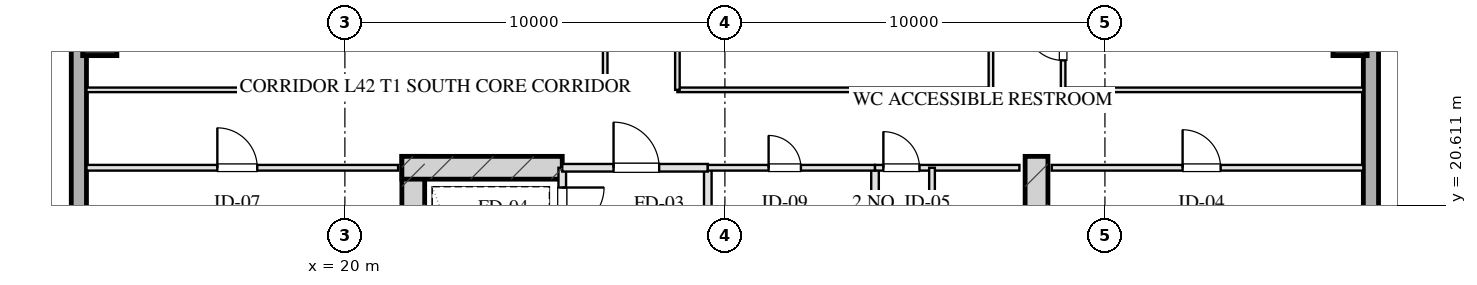
"""IFC4 building model, lengths in metres.
Left out: names, types, materials, properties, quantities, classifications, styles, units other than length and angle.
Written with IfcOpenShell. Run it as: python <this file> out.ifc"""

import sys

from ifc_helpers import new_model, si_unit, direction, frame, frame_2d, origin, origin_2d, place, context, subcontext, project, spatial, rectangle, hollow_rectangle, extrude, element, fill, save


model = new_model("IFC4")
c1 = context("Model", 3, precision=1e-05, world=origin(), true_north=direction((0.0, 1.0)))
c2 = subcontext(c1, "Body", "Model", "MODEL_VIEW")
j1 = project(units=[si_unit("LENGTHUNIT", "METRE"), si_unit("PLANEANGLEUNIT", "RADIAN")], contexts=[c1])
p1 = place(None, origin())
s1 = spatial("IfcSite", under=j1, at=p1, CompositionType="ELEMENT")
p2 = place(p1, origin())
s2 = spatial("IfcBuilding", under=s1, at=p2, CompositionType="ELEMENT")
p3 = place(p2, frame((0.0, 0.0, 159.85)))
s3 = spatial("IfcBuildingStorey", under=s2, at=p3, CompositionType="ELEMENT", Elevation=159.85)
for number, where, z_axis, x_axis in (
    (1, (21.8, 21.9, 0.0), (0.0, 0.0, 1.0), (0.0, -1.0, 0.0)),
    (2, (38.2, 21.9, 0.0), (0.0, 0.0, 1.0), (0.0, -1.0, 0.0)),
):
    element("IfcWall", number, at=place(p3, frame(where, z_axis=z_axis, x_axis=x_axis)), inside=s3, PredefinedType="SHEAR", context=c2, shape_type="SweptSolid", body=[
        extrude(rectangle(XDim=9.48, YDim=0.6, at=frame_2d((4.74, 0.0))), origin(), (0.0, 0.0, 1.0), 3.45),
    ])
p4 = place(p3, frame((21.5, 21.6, 0.0), z_axis=(0.0, 0.0, 1.0), x_axis=(1.0, 0.0, 0.0)))
e3 = element("IfcWall", 3, at=p4, inside=s3, PredefinedType="SHEAR", context=c2, shape_type="SweptSolid", body=[
    extrude(rectangle(XDim=4.22, YDim=0.6, at=frame_2d((2.11, 0.0))), origin(), (0.0, 0.0, 1.0), 3.45),
])
for number, where, z_axis, x_axis in (
    (4, (13.55, 25.0, 0.0), (0.0, 0.0, 1.0), (1.0, 0.0, 0.0)),
    (5, (46.45, 25.0, 0.0), (0.0, 0.0, 1.0), (1.0, 0.0, 0.0)),
):
    element("IfcColumn", number, at=place(p3, frame(where, z_axis=z_axis, x_axis=x_axis)), inside=s3, PredefinedType="COLUMN", context=c2, shape_type="SweptSolid", body=[
        extrude(hollow_rectangle(XDim=0.9, YDim=0.9, WallThickness=0.032, at=origin_2d()), origin(), (0.0, 0.0, 1.0), 3.451),
    ])
p5 = place(p3, frame((13.0, 10.8, 0.0), z_axis=(0.0, 0.0, 1.0), x_axis=(0.0, 1.0, 0.0)))
e6 = element("IfcWall", 6, at=p5, inside=s3, PredefinedType="SOLIDWALL", context=c2, shape_type="SweptSolid", body=[
    extrude(rectangle(XDim=46.4, YDim=0.4, at=frame_2d((23.2, 0.0))), origin(), (0.0, 0.0, 1.0), 2.61),
])
p6 = place(p5, frame((15.675, 0.0, 0.75)))
e7 = element("IfcOpeningElement", 7, at=p6, cuts=e6, PredefinedType="OPENING", context=c2, shape_type="SweptSolid", body=[
    extrude(rectangle(XDim=2.25, YDim=1.46, at=frame_2d((1.125, 0.73))), frame((0.0, 0.21, 0.0), z_axis=(0.0, -1.0, 0.0), x_axis=(1.0, 0.0, 0.0)), (0.0, 0.0, 1.0), 0.42),
])
p7 = place(p5, frame((28.475, 0.0, 0.75)))
e8 = element("IfcOpeningElement", 8, at=p7, cuts=e6, PredefinedType="OPENING", context=c2, shape_type="SweptSolid", body=[
    extrude(rectangle(XDim=2.25, YDim=1.46, at=frame_2d((1.125, 0.73))), frame((0.0, 0.21, 0.0), z_axis=(0.0, -1.0, 0.0), x_axis=(1.0, 0.0, 0.0)), (0.0, 0.0, 1.0), 0.42),
])
p8 = place(p3, frame((47.0, 57.2, 0.0), z_axis=(0.0, 0.0, 1.0), x_axis=(0.0, -1.0, 0.0)))
e9 = element("IfcWall", 9, at=p8, inside=s3, PredefinedType="SOLIDWALL", context=c2, shape_type="SweptSolid", body=[
    extrude(rectangle(XDim=46.4, YDim=0.4, at=frame_2d((23.2, 0.0))), origin(), (0.0, 0.0, 1.0), 2.61),
])
p9 = place(p3, frame((25.72, 21.6, 0.0), z_axis=(0.0, 0.0, 1.0), x_axis=(0.0, -1.0, 0.0)))
e10 = element("IfcWall", 10, at=p9, inside=s3, PredefinedType="PARTITIONING", context=c2, shape_type="SweptSolid", body=[
    extrude(rectangle(XDim=1.9, YDim=0.2, at=frame_2d((0.95, 0.0))), origin(), (0.0, 0.0, 1.0), 3.175),
])
p10 = place(p9, frame((0.52, 0.0, 0.0)))
e11 = element("IfcOpeningElement", 11, at=p10, cuts=e10, PredefinedType="OPENING", context=c2, shape_type="SweptSolid", body=[
    extrude(rectangle(XDim=1.1, YDim=2.05, at=frame_2d((0.55, 1.025))), frame((0.0, 0.11, 0.0), z_axis=(0.0, -1.0, 0.0), x_axis=(1.0, 0.0, 0.0)), (0.0, 0.0, 1.0), 0.22),
])
p11 = place(p3, frame((29.55, 21.6, 0.0), z_axis=(0.0, 0.0, 1.0), x_axis=(0.0, -1.0, 0.0)))
e12 = element("IfcWall", 12, at=p11, inside=s3, PredefinedType="PARTITIONING", context=c2, shape_type="SweptSolid", body=[
    extrude(rectangle(XDim=8.43, YDim=0.2, at=frame_2d((4.215, 0.0))), origin(), (0.0, 0.0, 1.0), 3.175),
])
p12 = place(p3, frame((25.72, 21.6, 0.0), z_axis=(0.0, 0.0, 1.0), x_axis=(1.0, 0.0, 0.0)))
e13 = element("IfcWall", 13, at=p12, inside=s3, PredefinedType="PARTITIONING", context=c2, shape_type="SweptSolid", body=[
    extrude(rectangle(XDim=3.83, YDim=0.2, at=frame_2d((1.915, 0.0))), origin(), (0.0, 0.0, 1.0), 3.175),
])
p13 = place(p12, frame((1.35, 0.0, 0.0)))
e14 = element("IfcOpeningElement", 14, at=p13, cuts=e13, PredefinedType="OPENING", context=c2, shape_type="SweptSolid", body=[
    extrude(rectangle(XDim=1.2, YDim=2.05, at=frame_2d((0.6, 1.025))), frame((0.0, 0.11, 0.0), z_axis=(0.0, -1.0, 0.0), x_axis=(1.0, 0.0, 0.0)), (0.0, 0.0, 1.0), 0.22),
])
p14 = place(p3, frame((33.95, 21.6, 0.0), z_axis=(0.0, 0.0, 1.0), x_axis=(0.0, -1.0, 0.0)))
e15 = element("IfcWall", 15, at=p14, inside=s3, PredefinedType="PARTITIONING", context=c2, shape_type="SweptSolid", body=[
    extrude(rectangle(XDim=8.43, YDim=0.2, at=frame_2d((4.215, 0.0))), origin(), (0.0, 0.0, 1.0), 3.175),
])
p15 = place(p3, frame((29.55, 21.6, 0.0), z_axis=(0.0, 0.0, 1.0), x_axis=(1.0, 0.0, 0.0)))
e16 = element("IfcWall", 16, at=p15, inside=s3, PredefinedType="PARTITIONING", context=c2, shape_type="SweptSolid", body=[
    extrude(rectangle(XDim=4.4, YDim=0.15, at=frame_2d((2.2, 0.0))), origin(), (0.0, 0.0, 1.0), 3.175),
])
p16 = place(p15, frame((1.6, 0.0, 0.0)))
e17 = element("IfcOpeningElement", 17, at=p16, cuts=e16, PredefinedType="OPENING", context=c2, shape_type="SweptSolid", body=[
    extrude(rectangle(XDim=0.85, YDim=2.05, at=frame_2d((0.425, 1.025))), frame((0.0, 0.085, 0.0), z_axis=(0.0, -1.0, 0.0), x_axis=(1.0, 0.0, 0.0)), (0.0, 0.0, 1.0), 0.17),
])
p17 = place(p3, frame((33.95, 21.6, 0.0), z_axis=(0.0, 0.0, 1.0), x_axis=(1.0, 0.0, 0.0)))
e18 = element("IfcWall", 18, at=p17, inside=s3, PredefinedType="PARTITIONING", context=c2, shape_type="SweptSolid", body=[
    extrude(rectangle(XDim=3.8, YDim=0.15, at=frame_2d((1.9, 0.0))), origin(), (0.0, 0.0, 1.0), 3.175),
])
p18 = place(p17, frame((0.22, 0.0, 0.0)))
e19 = element("IfcOpeningElement", 19, at=p18, cuts=e18, PredefinedType="OPENING", context=c2, shape_type="SweptSolid", body=[
    extrude(rectangle(XDim=0.95, YDim=2.05, at=frame_2d((0.475, 1.025))), frame((0.0, 0.085, 0.0), z_axis=(0.0, -1.0, 0.0), x_axis=(1.0, 0.0, 0.0)), (0.0, 0.0, 1.0), 0.17),
])
p19 = place(p3, frame((35.45, 21.6, 0.0), z_axis=(0.0, 0.0, 1.0), x_axis=(0.0, -1.0, 0.0)))
e20 = element("IfcWall", 20, at=p19, inside=s3, PredefinedType="PARTITIONING", context=c2, shape_type="SweptSolid", body=[
    extrude(rectangle(XDim=8.43, YDim=0.15, at=frame_2d((4.215, 0.0))), origin(), (0.0, 0.0, 1.0), 2.765),
])
p20 = place(p19, frame((2.55, 0.0, 0.0)))
e21 = element("IfcOpeningElement", 21, at=p20, cuts=e20, PredefinedType="OPENING", context=c2, shape_type="SweptSolid", body=[
    extrude(rectangle(XDim=0.95, YDim=2.05, at=frame_2d((0.475, 1.025))), frame((0.0, 0.085, 0.0), z_axis=(0.0, -1.0, 0.0), x_axis=(1.0, 0.0, 0.0)), (0.0, 0.0, 1.0), 0.17),
])
p21 = place(p19, frame((5.8, 0.0, 0.0)))
e22 = element("IfcOpeningElement", 22, at=p21, cuts=e20, PredefinedType="OPENING", context=c2, shape_type="SweptSolid", body=[
    extrude(rectangle(XDim=0.9, YDim=2.05, at=frame_2d((0.45, 1.025))), frame((0.0, 0.085, 0.0), z_axis=(0.0, -1.0, 0.0), x_axis=(1.0, 0.0, 0.0)), (0.0, 0.0, 1.0), 0.17),
])
p22 = place(p3, frame((13.2, 21.6, 0.0), z_axis=(0.0, 0.0, 1.0), x_axis=(1.0, 0.0, 0.0)))
e23 = element("IfcWall", 23, at=p22, inside=s3, PredefinedType="PARTITIONING", context=c2, shape_type="SweptSolid", body=[
    extrude(rectangle(XDim=8.2, YDim=0.15, at=frame_2d((4.1, 0.0))), origin(), (0.0, 0.0, 1.0), 3.175),
])
p23 = place(p22, frame((3.444, 0.0, 0.0)))
e24 = element("IfcOpeningElement", 24, at=p23, cuts=e23, PredefinedType="OPENING", context=c2, shape_type="SweptSolid", body=[
    extrude(rectangle(XDim=1.05, YDim=2.05, at=frame_2d((0.525, 1.025))), frame((0.0, 0.085, 0.0), z_axis=(0.0, -1.0, 0.0), x_axis=(1.0, 0.0, 0.0)), (0.0, 0.0, 1.0), 0.17),
])
p24 = place(p3, frame((38.6, 21.6, 0.0), z_axis=(0.0, 0.0, 1.0), x_axis=(1.0, 0.0, 0.0)))
e25 = element("IfcWall", 25, at=p24, inside=s3, PredefinedType="PARTITIONING", context=c2, shape_type="SweptSolid", body=[
    extrude(rectangle(XDim=8.2, YDim=0.15, at=frame_2d((4.1, 0.0))), origin(), (0.0, 0.0, 1.0), 3.175),
])
p25 = place(p24, frame((3.444, 0.0, 0.0)))
e26 = element("IfcOpeningElement", 26, at=p25, cuts=e25, PredefinedType="OPENING", context=c2, shape_type="SweptSolid", body=[
    extrude(rectangle(XDim=1.0, YDim=2.05, at=frame_2d((0.5, 1.025))), frame((0.0, 0.085, 0.0), z_axis=(0.0, -1.0, 0.0), x_axis=(1.0, 0.0, 0.0)), (0.0, 0.0, 1.0), 0.17),
])
p26 = place(p3, frame((13.2, 23.65, 0.0), z_axis=(0.0, 0.0, 1.0), x_axis=(1.0, 0.0, 0.0)))
e27 = element("IfcWall", 27, at=p26, inside=s3, PredefinedType="PARTITIONING", context=c2, shape_type="SweptSolid", body=[
    extrude(rectangle(XDim=13.65, YDim=0.12, at=frame_2d((6.825, 0.0))), origin(), (0.0, 0.0, 1.0), 3.175),
])
p27 = place(p3, frame((28.75, 23.65, 0.0), z_axis=(0.0, 0.0, 1.0), x_axis=(1.0, 0.0, 0.0)))
e28 = element("IfcWall", 28, at=p27, inside=s3, PredefinedType="PARTITIONING", context=c2, shape_type="SweptSolid", body=[
    extrude(rectangle(XDim=8.25, YDim=0.12, at=frame_2d((4.125, 0.0))), origin(), (0.0, 0.0, 1.0), 3.175),
])
p28 = place(p3, frame((38.9, 23.65, 0.0), z_axis=(0.0, 0.0, 1.0), x_axis=(1.0, 0.0, 0.0)))
e29 = element("IfcWall", 29, at=p28, inside=s3, PredefinedType="PARTITIONING", context=c2, shape_type="SweptSolid", body=[
    extrude(rectangle(XDim=7.9, YDim=0.12, at=frame_2d((3.95, 0.0))), origin(), (0.0, 0.0, 1.0), 3.175),
])
p29 = place(p3, frame((26.85, 23.65, 0.0), z_axis=(0.0, 0.0, 1.0), x_axis=(0.0, 1.0, 0.0)))
e30 = element("IfcWall", 30, at=p29, inside=s3, PredefinedType="PARTITIONING", context=c2, shape_type="SweptSolid", body=[
    extrude(rectangle(XDim=20.7, YDim=0.12, at=frame_2d((10.35, 0.0))), origin(), (0.0, 0.0, 1.0), 3.175),
])
p30 = place(p29, frame((2.675, 0.0, 0.0)))
e31 = element("IfcOpeningElement", 31, at=p30, cuts=e30, PredefinedType="OPENING", context=c2, shape_type="SweptSolid", body=[
    extrude(rectangle(XDim=1.0, YDim=2.05, at=frame_2d((0.5, 1.025))), frame((0.0, 0.07, 0.0), z_axis=(0.0, -1.0, 0.0), x_axis=(1.0, 0.0, 0.0)), (0.0, 0.0, 1.0), 0.14),
])
p31 = place(p29, frame((9.85, 0.0, 0.0)))
e32 = element("IfcOpeningElement", 32, at=p31, cuts=e30, PredefinedType="OPENING", context=c2, shape_type="SweptSolid", body=[
    extrude(rectangle(XDim=1.0, YDim=2.05, at=frame_2d((0.5, 1.025))), frame((0.0, 0.07, 0.0), z_axis=(0.0, -1.0, 0.0), x_axis=(1.0, 0.0, 0.0)), (0.0, 0.0, 1.0), 0.14),
])
p32 = place(p29, frame((17.025, 0.0, 0.0)))
e33 = element("IfcOpeningElement", 33, at=p32, cuts=e30, PredefinedType="OPENING", context=c2, shape_type="SweptSolid", body=[
    extrude(rectangle(XDim=1.0, YDim=2.05, at=frame_2d((0.5, 1.025))), frame((0.0, 0.07, 0.0), z_axis=(0.0, -1.0, 0.0), x_axis=(1.0, 0.0, 0.0)), (0.0, 0.0, 1.0), 0.14),
])
p33 = place(p3, frame((28.75, 23.65, 0.0), z_axis=(0.0, 0.0, 1.0), x_axis=(0.0, 1.0, 0.0)))
e34 = element("IfcWall", 34, at=p33, inside=s3, PredefinedType="PARTITIONING", context=c2, shape_type="SweptSolid", body=[
    extrude(rectangle(XDim=20.7, YDim=0.12, at=frame_2d((10.35, 0.0))), origin(), (0.0, 0.0, 1.0), 3.175),
])
p34 = place(p33, frame((9.936, 0.0, 0.0)))
e35 = element("IfcOpeningElement", 35, at=p34, cuts=e34, PredefinedType="OPENING", context=c2, shape_type="SweptSolid", body=[
    extrude(rectangle(XDim=1.1, YDim=2.05, at=frame_2d((0.55, 1.025))), frame((0.0, 0.07, 0.0), z_axis=(0.0, -1.0, 0.0), x_axis=(1.0, 0.0, 0.0)), (0.0, 0.0, 1.0), 0.14),
])
p35 = place(p3, frame((37.0, 23.65, 0.0), z_axis=(0.0, 0.0, 1.0), x_axis=(0.0, 1.0, 0.0)))
e36 = element("IfcWall", 36, at=p35, inside=s3, PredefinedType="PARTITIONING", context=c2, shape_type="SweptSolid", body=[
    extrude(rectangle(XDim=20.7, YDim=0.12, at=frame_2d((10.35, 0.0))), origin(), (0.0, 0.0, 1.0), 3.175),
])
p36 = place(p3, frame((38.9, 23.65, 0.0), z_axis=(0.0, 0.0, 1.0), x_axis=(0.0, 1.0, 0.0)))
e37 = element("IfcWall", 37, at=p36, inside=s3, PredefinedType="PARTITIONING", context=c2, shape_type="SweptSolid", body=[
    extrude(rectangle(XDim=20.7, YDim=0.12, at=frame_2d((10.35, 0.0))), origin(), (0.0, 0.0, 1.0), 3.175),
])
p37 = place(p36, frame((0.775, 0.0, 0.0)))
e38 = element("IfcOpeningElement", 38, at=p37, cuts=e37, PredefinedType="OPENING", context=c2, shape_type="SweptSolid", body=[
    extrude(rectangle(XDim=1.0, YDim=2.05, at=frame_2d((0.5, 1.025))), frame((0.0, 0.07, 0.0), z_axis=(0.0, -1.0, 0.0), x_axis=(1.0, 0.0, 0.0)), (0.0, 0.0, 1.0), 0.14),
])
p38 = place(p36, frame((3.95, 0.0, 0.0)))
e39 = element("IfcOpeningElement", 39, at=p38, cuts=e37, PredefinedType="OPENING", context=c2, shape_type="SweptSolid", body=[
    extrude(rectangle(XDim=1.0, YDim=2.05, at=frame_2d((0.5, 1.025))), frame((0.0, 0.07, 0.0), z_axis=(0.0, -1.0, 0.0), x_axis=(1.0, 0.0, 0.0)), (0.0, 0.0, 1.0), 0.14),
])
p39 = place(p36, frame((8.45, 0.0, 0.0)))
e40 = element("IfcOpeningElement", 40, at=p39, cuts=e37, PredefinedType="OPENING", context=c2, shape_type="SweptSolid", body=[
    extrude(rectangle(XDim=1.0, YDim=2.05, at=frame_2d((0.5, 1.025))), frame((0.0, 0.07, 0.0), z_axis=(0.0, -1.0, 0.0), x_axis=(1.0, 0.0, 0.0)), (0.0, 0.0, 1.0), 0.14),
])
p40 = place(p36, frame((12.95, 0.0, 0.0)))
e41 = element("IfcOpeningElement", 41, at=p40, cuts=e37, PredefinedType="OPENING", context=c2, shape_type="SweptSolid", body=[
    extrude(rectangle(XDim=1.0, YDim=2.05, at=frame_2d((0.5, 1.025))), frame((0.0, 0.07, 0.0), z_axis=(0.0, -1.0, 0.0), x_axis=(1.0, 0.0, 0.0)), (0.0, 0.0, 1.0), 0.14),
])
p41 = place(p36, frame((16.299, 0.0, 0.0)))
e42 = element("IfcOpeningElement", 42, at=p41, cuts=e37, PredefinedType="OPENING", context=c2, shape_type="SweptSolid", body=[
    extrude(rectangle(XDim=1.0, YDim=2.05, at=frame_2d((0.5, 1.025))), frame((0.0, 0.07, 0.0), z_axis=(0.0, -1.0, 0.0), x_axis=(1.0, 0.0, 0.0)), (0.0, 0.0, 1.0), 0.14),
])
p42 = place(p36, frame((18.974, 0.0, 0.0)))
e43 = element("IfcOpeningElement", 43, at=p42, cuts=e37, PredefinedType="OPENING", context=c2, shape_type="SweptSolid", body=[
    extrude(rectangle(XDim=0.85, YDim=2.05, at=frame_2d((0.425, 1.025))), frame((0.0, 0.07, 0.0), z_axis=(0.0, -1.0, 0.0), x_axis=(1.0, 0.0, 0.0)), (0.0, 0.0, 1.0), 0.14),
])
p43 = place(p10, origin())
e44 = element("IfcDoor", 44, at=p43, inside=s3, OperationType="SINGLE_SWING_LEFT", PredefinedType="DOOR", context=c2, shape_type="SweptSolid", body=[
    extrude(rectangle(XDim=1.1, YDim=2.05, at=frame_2d((0.55, 1.025))), frame((0.0, 0.025, 0.0), z_axis=(0.0, -1.0, 0.0), x_axis=(1.0, 0.0, 0.0)), (0.0, 0.0, 1.0), 0.05),
])
fill(e11, e44)
p44 = place(p13, origin())
e45 = element("IfcDoor", 45, at=p44, inside=s3, OperationType="SINGLE_SWING_LEFT", PredefinedType="DOOR", context=c2, shape_type="SweptSolid", body=[
    extrude(rectangle(XDim=1.2, YDim=2.05, at=frame_2d((0.6, 1.025))), frame((0.0, 0.025, 0.0), z_axis=(0.0, -1.0, 0.0), x_axis=(1.0, 0.0, 0.0)), (0.0, 0.0, 1.0), 0.05),
])
fill(e14, e45)
p45 = place(p16, origin())
e46 = element("IfcDoor", 46, at=p45, inside=s3, OperationType="SINGLE_SWING_LEFT", PredefinedType="DOOR", context=c2, shape_type="SweptSolid", body=[
    extrude(rectangle(XDim=0.85, YDim=2.05, at=frame_2d((0.425, 1.025))), frame((0.0, 0.025, 0.0), z_axis=(0.0, -1.0, 0.0), x_axis=(1.0, 0.0, 0.0)), (0.0, 0.0, 1.0), 0.05),
])
fill(e17, e46)
p46 = place(p18, origin())
e47 = element("IfcDoor", 47, at=p46, inside=s3, OperationType="SINGLE_SWING_LEFT", PredefinedType="DOOR", context=c2, shape_type="SweptSolid", body=[
    extrude(rectangle(XDim=0.95, YDim=2.05, at=frame_2d((0.475, 1.025))), frame((0.0, 0.025, 0.0), z_axis=(0.0, -1.0, 0.0), x_axis=(1.0, 0.0, 0.0)), (0.0, 0.0, 1.0), 0.05),
])
fill(e19, e47)
p47 = place(p23, origin())
e48 = element("IfcDoor", 48, at=p47, inside=s3, OperationType="SINGLE_SWING_LEFT", PredefinedType="DOOR", context=c2, shape_type="SweptSolid", body=[
    extrude(rectangle(XDim=1.05, YDim=2.05, at=frame_2d((0.525, 1.025))), frame((0.0, 0.025, 0.0), z_axis=(0.0, -1.0, 0.0), x_axis=(1.0, 0.0, 0.0)), (0.0, 0.0, 1.0), 0.05),
])
fill(e24, e48)
p48 = place(p25, origin())
e49 = element("IfcDoor", 49, at=p48, inside=s3, OperationType="SINGLE_SWING_LEFT", PredefinedType="DOOR", context=c2, shape_type="SweptSolid", body=[
    extrude(rectangle(XDim=1.0, YDim=2.05, at=frame_2d((0.5, 1.025))), frame((0.0, 0.025, 0.0), z_axis=(0.0, -1.0, 0.0), x_axis=(1.0, 0.0, 0.0)), (0.0, 0.0, 1.0), 0.05),
])
fill(e26, e49)
p49 = place(p37, origin())
e50 = element("IfcDoor", 50, at=p49, inside=s3, OperationType="SINGLE_SWING_RIGHT", PredefinedType="DOOR", context=c2, shape_type="SweptSolid", body=[
    extrude(rectangle(XDim=1.0, YDim=2.05, at=frame_2d((0.5, 1.025))), frame((0.0, 0.025, 0.0), z_axis=(0.0, -1.0, 0.0), x_axis=(1.0, 0.0, 0.0)), (0.0, 0.0, 1.0), 0.05),
])
fill(e38, e50)
save(model, sys.argv[1])
